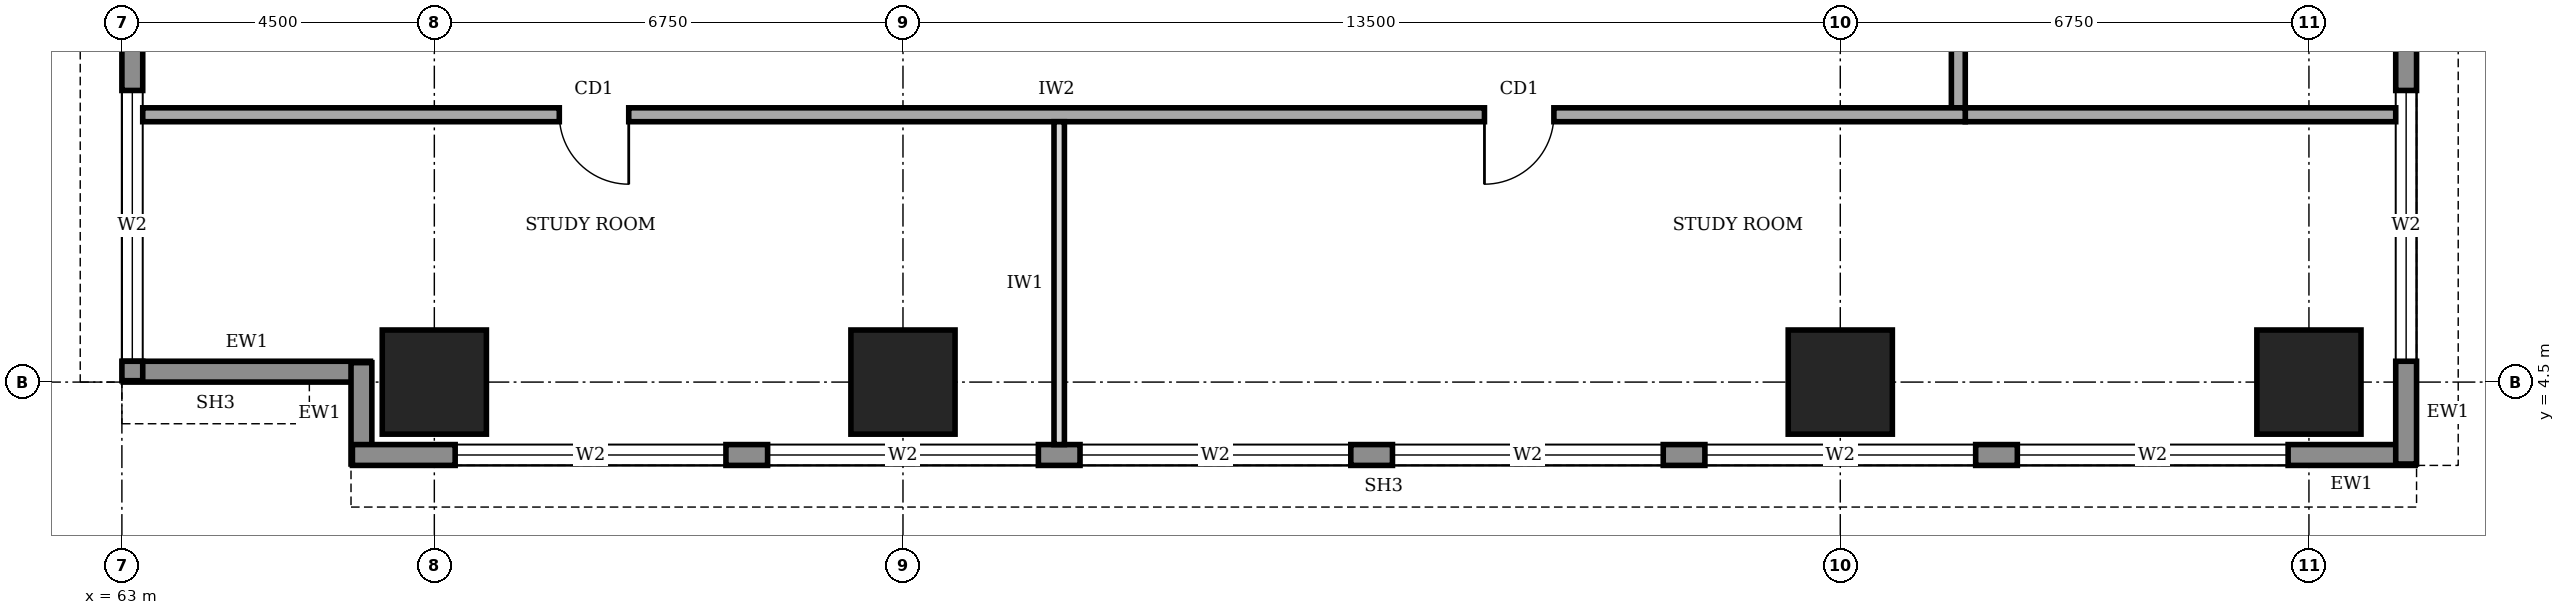
"""IFC4 building model, lengths in metres.
Left out: names, types, materials, properties, quantities, classifications, styles, units other than length and angle.
Written with IfcOpenShell. Run it as: python <this file> out.ifc"""

import sys

from ifc_helpers import new_model, si_unit, direction, frame, frame_2d, origin, origin_2d, place, context, subcontext, project, spatial, rectangle, extrude, element, fill, save


model = new_model("IFC4")
c1 = context("Model", 3, precision=1e-05, world=origin(), true_north=direction((0.0, 1.0)))
c2 = subcontext(c1, "Body", "Model", "MODEL_VIEW")
j1 = project(units=[si_unit("LENGTHUNIT", "METRE"), si_unit("PLANEANGLEUNIT", "RADIAN")], contexts=[c1])
p1 = place(None, origin())
s1 = spatial("IfcSite", under=j1, at=p1, CompositionType="ELEMENT")
p2 = place(p1, origin())
s2 = spatial("IfcBuilding", under=s1, at=p2, CompositionType="ELEMENT")
p3 = place(p2, frame((0.0, 0.0, 149.0)))
s3 = spatial("IfcBuildingStorey", under=s2, at=p3, CompositionType="ELEMENT", Elevation=149.0)
for number, where, z_axis, x_axis in (
    (1, (67.5, 4.5, 0.0), (0.0, 0.0, 1.0), (1.0, 0.0, 0.0)),
    (2, (74.25, 4.5, 0.0), (0.0, 0.0, 1.0), (1.0, 0.0, 0.0)),
    (3, (87.75, 4.5, 0.0), (0.0, 0.0, 1.0), (1.0, 0.0, 0.0)),
    (4, (94.5, 4.5, 0.0), (0.0, 0.0, 1.0), (1.0, 0.0, 0.0)),
):
    element("IfcColumn", number, at=place(p3, frame(where, z_axis=z_axis, x_axis=x_axis)), inside=s3, PredefinedType="COLUMN", context=c2, shape_type="SweptSolid", body=[
        extrude(rectangle(XDim=1.5, YDim=1.5, at=origin_2d()), origin(), (0.0, 0.0, 1.0), 4.0),
    ])
p4 = place(p3, frame((63.02, 4.65, 0.0), z_axis=(0.0, 0.0, 1.0), x_axis=(1.0, 0.0, 0.0)))
e5 = element("IfcWall", 5, at=p4, inside=s3, PredefinedType="STANDARD", context=c2, shape_type="SweptSolid", body=[
    extrude(rectangle(XDim=3.56, YDim=0.3, at=frame_2d((1.78, 0.0))), origin(), (0.0, 0.0, 1.0), 2.85),
])
p5 = place(p3, frame((66.45, 4.78, 0.0), z_axis=(0.0, 0.0, 1.0), x_axis=(0.0, -1.0, 0.0)))
e6 = element("IfcWall", 6, at=p5, inside=s3, PredefinedType="STANDARD", context=c2, shape_type="SweptSolid", body=[
    extrude(rectangle(XDim=1.46, YDim=0.3, at=frame_2d((0.73, 0.0))), origin(), (0.0, 0.0, 1.0), 3.75),
])
p6 = place(p3, frame((66.32, 3.45, 0.0), z_axis=(0.0, 0.0, 1.0), x_axis=(1.0, 0.0, 0.0)))
e7 = element("IfcWall", 7, at=p6, inside=s3, PredefinedType="STANDARD", context=c2, shape_type="SweptSolid", body=[
    extrude(rectangle(XDim=29.71, YDim=0.3, at=frame_2d((14.855, 0.0))), origin(), (0.0, 0.0, 1.0), 3.75),
])
p7 = place(p6, frame((1.48, 0.0, 0.6)))
e8 = element("IfcOpeningElement", 8, at=p7, cuts=e7, PredefinedType="OPENING", context=c2, shape_type="SweptSolid", body=[
    extrude(rectangle(XDim=3.9, YDim=2.6, at=frame_2d((1.95, 1.3))), frame((0.0, 0.16, 0.0), z_axis=(0.0, -1.0, 0.0), x_axis=(1.0, 0.0, 0.0)), (0.0, 0.0, 1.0), 0.32),
])
p8 = place(p6, frame((5.98, 0.0, 0.6)))
e9 = element("IfcOpeningElement", 9, at=p8, cuts=e7, PredefinedType="OPENING", context=c2, shape_type="SweptSolid", body=[
    extrude(rectangle(XDim=3.9, YDim=2.6, at=frame_2d((1.95, 1.3))), frame((0.0, 0.16, 0.0), z_axis=(0.0, -1.0, 0.0), x_axis=(1.0, 0.0, 0.0)), (0.0, 0.0, 1.0), 0.32),
])
p9 = place(p6, frame((10.48, 0.0, 0.6)))
e10 = element("IfcOpeningElement", 10, at=p9, cuts=e7, PredefinedType="OPENING", context=c2, shape_type="SweptSolid", body=[
    extrude(rectangle(XDim=3.9, YDim=2.6, at=frame_2d((1.95, 1.3))), frame((0.0, 0.16, 0.0), z_axis=(0.0, -1.0, 0.0), x_axis=(1.0, 0.0, 0.0)), (0.0, 0.0, 1.0), 0.32),
])
p10 = place(p6, frame((14.98, 0.0, 0.6)))
e11 = element("IfcOpeningElement", 11, at=p10, cuts=e7, PredefinedType="OPENING", context=c2, shape_type="SweptSolid", body=[
    extrude(rectangle(XDim=3.9, YDim=2.6, at=frame_2d((1.95, 1.3))), frame((0.0, 0.16, 0.0), z_axis=(0.0, -1.0, 0.0), x_axis=(1.0, 0.0, 0.0)), (0.0, 0.0, 1.0), 0.32),
])
p11 = place(p6, frame((19.48, 0.0, 0.6)))
e12 = element("IfcOpeningElement", 12, at=p11, cuts=e7, PredefinedType="OPENING", context=c2, shape_type="SweptSolid", body=[
    extrude(rectangle(XDim=3.9, YDim=2.6, at=frame_2d((1.95, 1.3))), frame((0.0, 0.16, 0.0), z_axis=(0.0, -1.0, 0.0), x_axis=(1.0, 0.0, 0.0)), (0.0, 0.0, 1.0), 0.32),
])
p12 = place(p6, frame((23.98, 0.0, 0.6)))
e13 = element("IfcOpeningElement", 13, at=p12, cuts=e7, PredefinedType="OPENING", context=c2, shape_type="SweptSolid", body=[
    extrude(rectangle(XDim=3.9, YDim=2.6, at=frame_2d((1.95, 1.3))), frame((0.0, 0.16, 0.0), z_axis=(0.0, -1.0, 0.0), x_axis=(1.0, 0.0, 0.0)), (0.0, 0.0, 1.0), 0.32),
])
p13 = place(p3, frame((95.9, 3.32, 0.0), z_axis=(0.0, 0.0, 1.0), x_axis=(0.0, 1.0, 0.0)))
e14 = element("IfcWall", 14, at=p13, inside=s3, PredefinedType="STANDARD", context=c2, shape_type="SweptSolid", body=[
    extrude(rectangle(XDim=33.86, YDim=0.3, at=frame_2d((16.93, 0.0))), origin(), (0.0, 0.0, 1.0), 3.75),
])
p14 = place(p13, frame((1.48, 0.0, 0.6)))
e15 = element("IfcOpeningElement", 15, at=p14, cuts=e14, PredefinedType="OPENING", context=c2, shape_type="SweptSolid", body=[
    extrude(rectangle(XDim=3.9, YDim=2.6, at=frame_2d((1.95, 1.3))), frame((0.0, 0.16, 0.0), z_axis=(0.0, -1.0, 0.0), x_axis=(1.0, 0.0, 0.0)), (0.0, 0.0, 1.0), 0.32),
])
p15 = place(p13, frame((5.98, 0.0, 0.6)))
e16 = element("IfcOpeningElement", 16, at=p15, cuts=e14, PredefinedType="OPENING", context=c2, shape_type="SweptSolid", body=[
    extrude(rectangle(XDim=3.9, YDim=2.6, at=frame_2d((1.95, 1.3))), frame((0.0, 0.16, 0.0), z_axis=(0.0, -1.0, 0.0), x_axis=(1.0, 0.0, 0.0)), (0.0, 0.0, 1.0), 0.32),
])
p16 = place(p13, frame((10.48, 0.0, 0.6)))
e17 = element("IfcOpeningElement", 17, at=p16, cuts=e14, PredefinedType="OPENING", context=c2, shape_type="SweptSolid", body=[
    extrude(rectangle(XDim=3.9, YDim=2.6, at=frame_2d((1.95, 1.3))), frame((0.0, 0.16, 0.0), z_axis=(0.0, -1.0, 0.0), x_axis=(1.0, 0.0, 0.0)), (0.0, 0.0, 1.0), 0.32),
])
p17 = place(p13, frame((14.98, 0.0, 0.6)))
e18 = element("IfcOpeningElement", 18, at=p17, cuts=e14, PredefinedType="OPENING", context=c2, shape_type="SweptSolid", body=[
    extrude(rectangle(XDim=3.9, YDim=2.6, at=frame_2d((1.95, 1.3))), frame((0.0, 0.16, 0.0), z_axis=(0.0, -1.0, 0.0), x_axis=(1.0, 0.0, 0.0)), (0.0, 0.0, 1.0), 0.32),
])
p18 = place(p13, frame((19.48, 0.0, 0.6)))
e19 = element("IfcOpeningElement", 19, at=p18, cuts=e14, PredefinedType="OPENING", context=c2, shape_type="SweptSolid", body=[
    extrude(rectangle(XDim=3.9, YDim=2.6, at=frame_2d((1.95, 1.3))), frame((0.0, 0.16, 0.0), z_axis=(0.0, -1.0, 0.0), x_axis=(1.0, 0.0, 0.0)), (0.0, 0.0, 1.0), 0.32),
])
p19 = place(p13, frame((23.98, 0.0, 0.6)))
e20 = element("IfcOpeningElement", 20, at=p19, cuts=e14, PredefinedType="OPENING", context=c2, shape_type="SweptSolid", body=[
    extrude(rectangle(XDim=3.9, YDim=2.6, at=frame_2d((1.95, 1.3))), frame((0.0, 0.16, 0.0), z_axis=(0.0, -1.0, 0.0), x_axis=(1.0, 0.0, 0.0)), (0.0, 0.0, 1.0), 0.32),
])
p20 = place(p13, frame((28.48, 0.0, 0.6)))
e21 = element("IfcOpeningElement", 21, at=p20, cuts=e14, PredefinedType="OPENING", context=c2, shape_type="SweptSolid", body=[
    extrude(rectangle(XDim=3.9, YDim=2.6, at=frame_2d((1.95, 1.3))), frame((0.0, 0.16, 0.0), z_axis=(0.0, -1.0, 0.0), x_axis=(1.0, 0.0, 0.0)), (0.0, 0.0, 1.0), 0.32),
])
p21 = place(p3, frame((63.15, 35.98, 0.0), z_axis=(0.0, 0.0, 1.0), x_axis=(0.0, -1.0, 0.0)))
e22 = element("IfcWall", 22, at=p21, inside=s3, PredefinedType="STANDARD", context=c2, shape_type="SweptSolid", body=[
    extrude(rectangle(XDim=31.46, YDim=0.3, at=frame_2d((15.73, 0.0))), origin(), (0.0, 0.0, 1.0), 3.75),
])
p22 = place(p21, frame((27.28, 0.0, 0.6)))
e23 = element("IfcOpeningElement", 23, at=p22, cuts=e22, PredefinedType="OPENING", context=c2, shape_type="SweptSolid", body=[
    extrude(rectangle(XDim=3.9, YDim=2.6, at=frame_2d((1.95, 1.3))), frame((0.0, 0.16, 0.0), z_axis=(0.0, -1.0, 0.0), x_axis=(1.0, 0.0, 0.0)), (0.0, 0.0, 1.0), 0.32),
])
p23 = place(p21, frame((22.78, 0.0, 0.6)))
e24 = element("IfcOpeningElement", 24, at=p23, cuts=e22, PredefinedType="OPENING", context=c2, shape_type="SweptSolid", body=[
    extrude(rectangle(XDim=3.9, YDim=2.6, at=frame_2d((1.95, 1.3))), frame((0.0, 0.16, 0.0), z_axis=(0.0, -1.0, 0.0), x_axis=(1.0, 0.0, 0.0)), (0.0, 0.0, 1.0), 0.32),
])
p24 = place(p21, frame((18.28, 0.0, 0.6)))
e25 = element("IfcOpeningElement", 25, at=p24, cuts=e22, PredefinedType="OPENING", context=c2, shape_type="SweptSolid", body=[
    extrude(rectangle(XDim=3.9, YDim=2.6, at=frame_2d((1.95, 1.3))), frame((0.0, 0.16, 0.0), z_axis=(0.0, -1.0, 0.0), x_axis=(1.0, 0.0, 0.0)), (0.0, 0.0, 1.0), 0.32),
])
p25 = place(p21, frame((13.78, 0.0, 0.6)))
e26 = element("IfcOpeningElement", 26, at=p25, cuts=e22, PredefinedType="OPENING", context=c2, shape_type="SweptSolid", body=[
    extrude(rectangle(XDim=3.9, YDim=2.6, at=frame_2d((1.95, 1.3))), frame((0.0, 0.16, 0.0), z_axis=(0.0, -1.0, 0.0), x_axis=(1.0, 0.0, 0.0)), (0.0, 0.0, 1.0), 0.32),
])
p26 = place(p21, frame((9.28, 0.0, 0.6)))
e27 = element("IfcOpeningElement", 27, at=p26, cuts=e22, PredefinedType="OPENING", context=c2, shape_type="SweptSolid", body=[
    extrude(rectangle(XDim=3.9, YDim=2.6, at=frame_2d((1.95, 1.3))), frame((0.0, 0.16, 0.0), z_axis=(0.0, -1.0, 0.0), x_axis=(1.0, 0.0, 0.0)), (0.0, 0.0, 1.0), 0.32),
])
p27 = place(p21, frame((4.78, 0.0, 0.6)))
e28 = element("IfcOpeningElement", 28, at=p27, cuts=e22, PredefinedType="OPENING", context=c2, shape_type="SweptSolid", body=[
    extrude(rectangle(XDim=3.9, YDim=2.6, at=frame_2d((1.95, 1.3))), frame((0.0, 0.16, 0.0), z_axis=(0.0, -1.0, 0.0), x_axis=(1.0, 0.0, 0.0)), (0.0, 0.0, 1.0), 0.32),
])
p28 = place(p3, frame((63.3, 8.35, 0.0), z_axis=(0.0, 0.0, 1.0), x_axis=(1.0, 0.0, 0.0)))
e29 = element("IfcWall", 29, at=p28, inside=s3, PredefinedType="SOLIDWALL", context=c2, shape_type="SweptSolid", body=[
    extrude(rectangle(XDim=26.25, YDim=0.2, at=frame_2d((13.125, 0.0))), origin(), (0.0, 0.0, 1.0), 3.75),
])
p29 = place(p28, frame((6.0, 0.0, 0.0)))
e30 = element("IfcOpeningElement", 30, at=p29, cuts=e29, PredefinedType="OPENING", context=c2, shape_type="SweptSolid", body=[
    extrude(rectangle(XDim=1.0, YDim=2.1, at=frame_2d((0.5, 1.05))), frame((0.0, 0.11, 0.0), z_axis=(0.0, -1.0, 0.0), x_axis=(1.0, 0.0, 0.0)), (0.0, 0.0, 1.0), 0.22),
])
p30 = place(p28, frame((19.325, 0.0, 0.0)))
e31 = element("IfcOpeningElement", 31, at=p30, cuts=e29, PredefinedType="OPENING", context=c2, shape_type="SweptSolid", body=[
    extrude(rectangle(XDim=1.0, YDim=2.1, at=frame_2d((0.5, 1.05))), frame((0.0, 0.11, 0.0), z_axis=(0.0, -1.0, 0.0), x_axis=(1.0, 0.0, 0.0)), (0.0, 0.0, 1.0), 0.22),
])
p31 = place(p3, frame((89.45, 8.45, 0.0), z_axis=(0.0, 0.0, 1.0), x_axis=(0.0, 1.0, 0.0)))
e32 = element("IfcWall", 32, at=p31, inside=s3, PredefinedType="SOLIDWALL", context=c2, shape_type="SweptSolid", body=[
    extrude(rectangle(XDim=23.8, YDim=0.2, at=frame_2d((11.9, 0.0))), origin(), (0.0, 0.0, 1.0), 3.75),
])
p32 = place(p31, frame((1.925, 0.0, 0.0)))
e33 = element("IfcOpeningElement", 33, at=p32, cuts=e32, PredefinedType="OPENING", context=c2, shape_type="SweptSolid", body=[
    extrude(rectangle(XDim=1.0, YDim=2.1, at=frame_2d((0.5, 1.05))), frame((0.0, 0.11, 0.0), z_axis=(0.0, -1.0, 0.0), x_axis=(1.0, 0.0, 0.0)), (0.0, 0.0, 1.0), 0.22),
])
p33 = place(p31, frame((5.65, 0.0, 0.0)))
e34 = element("IfcOpeningElement", 34, at=p33, cuts=e32, PredefinedType="OPENING", context=c2, shape_type="SweptSolid", body=[
    extrude(rectangle(XDim=1.0, YDim=2.1, at=frame_2d((0.5, 1.05))), frame((0.0, 0.11, 0.0), z_axis=(0.0, -1.0, 0.0), x_axis=(1.0, 0.0, 0.0)), (0.0, 0.0, 1.0), 0.22),
])
p34 = place(p31, frame((8.75, 0.0, 0.0)))
e35 = element("IfcOpeningElement", 35, at=p34, cuts=e32, PredefinedType="OPENING", context=c2, shape_type="SweptSolid", body=[
    extrude(rectangle(XDim=0.9, YDim=2.1, at=frame_2d((0.45, 1.05))), frame((0.0, 0.11, 0.0), z_axis=(0.0, -1.0, 0.0), x_axis=(1.0, 0.0, 0.0)), (0.0, 0.0, 1.0), 0.22),
])
p35 = place(p31, frame((11.8, 0.0, 0.0)))
e36 = element("IfcOpeningElement", 36, at=p35, cuts=e32, PredefinedType="OPENING", context=c2, shape_type="SweptSolid", body=[
    extrude(rectangle(XDim=0.9, YDim=2.1, at=frame_2d((0.45, 1.05))), frame((0.0, 0.11, 0.0), z_axis=(0.0, -1.0, 0.0), x_axis=(1.0, 0.0, 0.0)), (0.0, 0.0, 1.0), 0.22),
])
p36 = place(p31, frame((16.5, 0.0, 0.0)))
e37 = element("IfcOpeningElement", 37, at=p36, cuts=e32, PredefinedType="OPENING", context=c2, shape_type="SweptSolid", body=[
    extrude(rectangle(XDim=0.9, YDim=2.1, at=frame_2d((0.45, 1.05))), frame((0.0, 0.11, 0.0), z_axis=(0.0, -1.0, 0.0), x_axis=(1.0, 0.0, 0.0)), (0.0, 0.0, 1.0), 0.22),
])
p37 = place(p31, frame((13.85, 0.0, 0.0)))
e38 = element("IfcOpeningElement", 38, at=p37, cuts=e32, PredefinedType="OPENING", context=c2, shape_type="SweptSolid", body=[
    extrude(rectangle(XDim=1.0, YDim=2.1, at=frame_2d((0.5, 1.05))), frame((0.0, 0.11, 0.0), z_axis=(0.0, -1.0, 0.0), x_axis=(1.0, 0.0, 0.0)), (0.0, 0.0, 1.0), 0.22),
])
p38 = place(p31, frame((20.675, 0.0, 0.0)))
e39 = element("IfcOpeningElement", 39, at=p38, cuts=e32, PredefinedType="OPENING", context=c2, shape_type="SweptSolid", body=[
    extrude(rectangle(XDim=1.0, YDim=2.1, at=frame_2d((0.5, 1.05))), frame((0.0, 0.11, 0.0), z_axis=(0.0, -1.0, 0.0), x_axis=(1.0, 0.0, 0.0)), (0.0, 0.0, 1.0), 0.22),
])
p39 = place(p3, frame((89.55, 8.35, 0.0), z_axis=(0.0, 0.0, 1.0), x_axis=(1.0, 0.0, 0.0)))
e40 = element("IfcWall", 40, at=p39, inside=s3, PredefinedType="SOLIDWALL", context=c2, shape_type="SweptSolid", body=[
    extrude(rectangle(XDim=6.2, YDim=0.2, at=frame_2d((3.1, 0.0))), origin(), (0.0, 0.0, 1.0), 3.75),
])
p40 = place(p3, frame((76.5, 3.6, 0.0), z_axis=(0.0, 0.0, 1.0), x_axis=(0.0, 1.0, 0.0)))
e41 = element("IfcWall", 41, at=p40, inside=s3, PredefinedType="PARTITIONING", context=c2, shape_type="SweptSolid", body=[
    extrude(rectangle(XDim=4.65, YDim=0.15, at=frame_2d((2.325, 0.0))), origin(), (0.0, 0.0, 1.0), 3.75),
])
p41 = place(p7, origin())
e42 = element("IfcWindow", 42, at=p41, inside=s3, PartitioningType="SINGLE_PANEL", PredefinedType="WINDOW", context=c2, shape_type="SweptSolid", body=[
    extrude(rectangle(XDim=3.9, YDim=2.6, at=frame_2d((1.95, 1.3))), frame((0.0, 0.03, 0.0), z_axis=(0.0, -1.0, 0.0), x_axis=(1.0, 0.0, 0.0)), (0.0, 0.0, 1.0), 0.06),
])
fill(e8, e42)
p42 = place(p8, origin())
e43 = element("IfcWindow", 43, at=p42, inside=s3, PartitioningType="SINGLE_PANEL", PredefinedType="WINDOW", context=c2, shape_type="SweptSolid", body=[
    extrude(rectangle(XDim=3.9, YDim=2.6, at=frame_2d((1.95, 1.3))), frame((0.0, 0.03, 0.0), z_axis=(0.0, -1.0, 0.0), x_axis=(1.0, 0.0, 0.0)), (0.0, 0.0, 1.0), 0.06),
])
fill(e9, e43)
p43 = place(p9, origin())
e44 = element("IfcWindow", 44, at=p43, inside=s3, PartitioningType="SINGLE_PANEL", PredefinedType="WINDOW", context=c2, shape_type="SweptSolid", body=[
    extrude(rectangle(XDim=3.9, YDim=2.6, at=frame_2d((1.95, 1.3))), frame((0.0, 0.03, 0.0), z_axis=(0.0, -1.0, 0.0), x_axis=(1.0, 0.0, 0.0)), (0.0, 0.0, 1.0), 0.06),
])
fill(e10, e44)
p44 = place(p10, origin())
e45 = element("IfcWindow", 45, at=p44, inside=s3, PartitioningType="SINGLE_PANEL", PredefinedType="WINDOW", context=c2, shape_type="SweptSolid", body=[
    extrude(rectangle(XDim=3.9, YDim=2.6, at=frame_2d((1.95, 1.3))), frame((0.0, 0.03, 0.0), z_axis=(0.0, -1.0, 0.0), x_axis=(1.0, 0.0, 0.0)), (0.0, 0.0, 1.0), 0.06),
])
fill(e11, e45)
p45 = place(p11, origin())
e46 = element("IfcWindow", 46, at=p45, inside=s3, PartitioningType="SINGLE_PANEL", PredefinedType="WINDOW", context=c2, shape_type="SweptSolid", body=[
    extrude(rectangle(XDim=3.9, YDim=2.6, at=frame_2d((1.95, 1.3))), frame((0.0, 0.03, 0.0), z_axis=(0.0, -1.0, 0.0), x_axis=(1.0, 0.0, 0.0)), (0.0, 0.0, 1.0), 0.06),
])
fill(e12, e46)
p46 = place(p12, origin())
e47 = element("IfcWindow", 47, at=p46, inside=s3, PartitioningType="SINGLE_PANEL", PredefinedType="WINDOW", context=c2, shape_type="SweptSolid", body=[
    extrude(rectangle(XDim=3.9, YDim=2.6, at=frame_2d((1.95, 1.3))), frame((0.0, 0.03, 0.0), z_axis=(0.0, -1.0, 0.0), x_axis=(1.0, 0.0, 0.0)), (0.0, 0.0, 1.0), 0.06),
])
fill(e13, e47)
p47 = place(p14, origin())
e48 = element("IfcWindow", 48, at=p47, inside=s3, PartitioningType="SINGLE_PANEL", PredefinedType="WINDOW", context=c2, shape_type="SweptSolid", body=[
    extrude(rectangle(XDim=3.9, YDim=2.6, at=frame_2d((1.95, 1.3))), frame((0.0, 0.03, 0.0), z_axis=(0.0, -1.0, 0.0), x_axis=(1.0, 0.0, 0.0)), (0.0, 0.0, 1.0), 0.06),
])
fill(e15, e48)
p48 = place(p22, origin())
e49 = element("IfcWindow", 49, at=p48, inside=s3, PartitioningType="SINGLE_PANEL", PredefinedType="WINDOW", context=c2, shape_type="SweptSolid", body=[
    extrude(rectangle(XDim=3.9, YDim=2.6, at=frame_2d((1.95, 1.3))), frame((0.0, 0.03, 0.0), z_axis=(0.0, -1.0, 0.0), x_axis=(1.0, 0.0, 0.0)), (0.0, 0.0, 1.0), 0.06),
])
fill(e23, e49)
p49 = place(p29, frame((1.0, 0.0, 0.0), z_axis=(0.0, 0.0, 1.0), x_axis=(-1.0, 0.0, 0.0)))
e50 = element("IfcDoor", 50, at=p49, inside=s3, OperationType="SINGLE_SWING_LEFT", PredefinedType="DOOR", context=c2, shape_type="SweptSolid", body=[
    extrude(rectangle(XDim=1.0, YDim=2.1, at=frame_2d((0.5, 1.05))), frame((0.0, 0.025, 0.0), z_axis=(0.0, -1.0, 0.0), x_axis=(1.0, 0.0, 0.0)), (0.0, 0.0, 1.0), 0.05),
])
fill(e30, e50)
p50 = place(p30, frame((1.0, 0.0, 0.0), z_axis=(0.0, 0.0, 1.0), x_axis=(-1.0, 0.0, 0.0)))
e51 = element("IfcDoor", 51, at=p50, inside=s3, OperationType="SINGLE_SWING_RIGHT", PredefinedType="DOOR", context=c2, shape_type="SweptSolid", body=[
    extrude(rectangle(XDim=1.0, YDim=2.1, at=frame_2d((0.5, 1.05))), frame((0.0, 0.025, 0.0), z_axis=(0.0, -1.0, 0.0), x_axis=(1.0, 0.0, 0.0)), (0.0, 0.0, 1.0), 0.05),
])
fill(e31, e51)
save(model, sys.argv[1])
